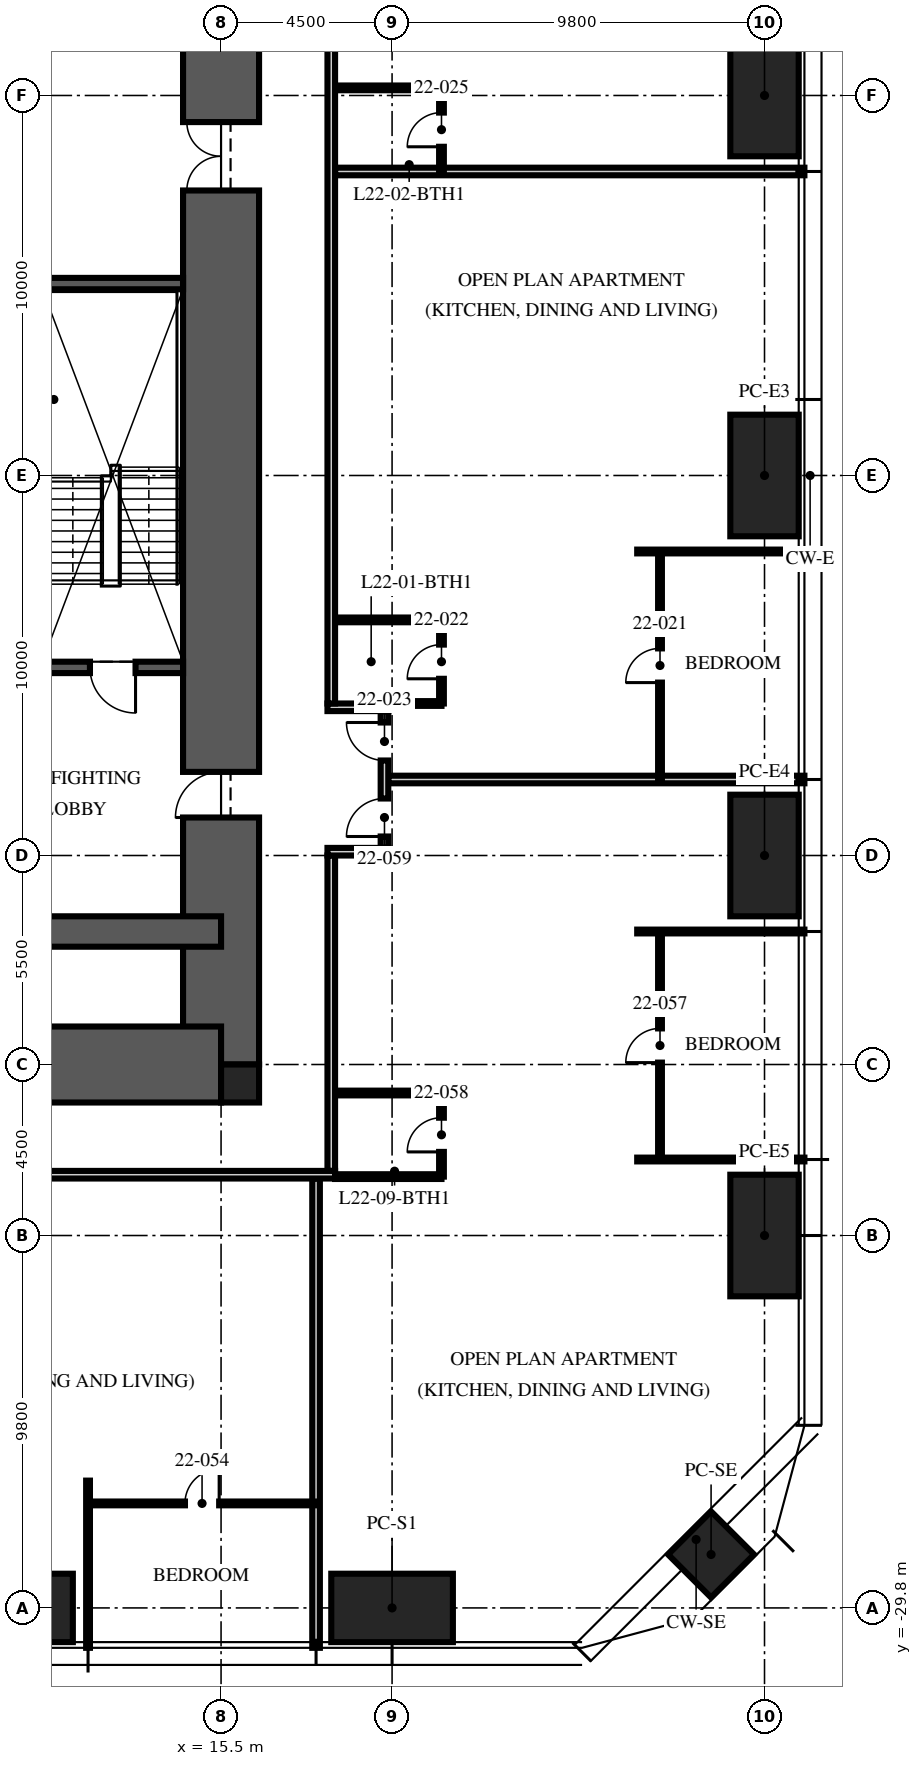
"""IFC4 building model, lengths in metres.
Left out: names, types, materials, properties, quantities, classifications, styles, units other than length and angle.
Written with IfcOpenShell. Run it as: python <this file> out.ifc"""

import sys

from ifc_helpers import new_model, si_unit, direction, frame, frame_2d, origin, origin_2d, place, context, subcontext, project, spatial, rectangle, hollow_rectangle, extrude, element, fill, save


model = new_model("IFC4")
c1 = context("Model", 3, precision=1e-05, world=origin(), true_north=direction((0.0, 1.0)))
c2 = subcontext(c1, "Body", "Model", "MODEL_VIEW")
j1 = project(units=[si_unit("LENGTHUNIT", "METRE"), si_unit("PLANEANGLEUNIT", "RADIAN")], contexts=[c1])
p1 = place(None, origin())
s1 = spatial("IfcSite", under=j1, at=p1, CompositionType="ELEMENT")
p2 = place(p1, origin())
s2 = spatial("IfcBuilding", under=s1, at=p2, CompositionType="ELEMENT")
p3 = place(p2, frame((0.0, 0.0, 88.5)))
s3 = spatial("IfcBuildingStorey", under=s2, at=p3, CompositionType="ELEMENT", Elevation=88.5)
p4 = place(p3, frame((15.5, -15.5, -0.25), z_axis=(0.0, 0.0, 1.0), x_axis=(0.0, 1.0, 0.0)))
e1 = element("IfcWall", 1, at=p4, inside=s3, PredefinedType="SHEAR", context=c2, shape_type="SweptSolid", body=[
    extrude(rectangle(XDim=31.0, YDim=2.0, at=frame_2d((15.5, 0.0))), origin(), (0.0, 0.0, 1.0), 3.75),
])
p5 = place(p4, frame((6.5, 0.0, 0.25)))
e2 = element("IfcOpeningElement", 2, at=p5, cuts=e1, PredefinedType="OPENING", context=c2, shape_type="SweptSolid", body=[
    extrude(rectangle(XDim=1.2, YDim=2.1, at=frame_2d((0.6, 1.05))), frame((0.0, 1.01, 0.0), z_axis=(0.0, -1.0, 0.0), x_axis=(1.0, 0.0, 0.0)), (0.0, 0.0, 1.0), 2.02),
])
p6 = place(p4, frame((23.0, 0.0, 0.25)))
e3 = element("IfcOpeningElement", 3, at=p6, cuts=e1, PredefinedType="OPENING", context=c2, shape_type="SweptSolid", body=[
    extrude(rectangle(XDim=1.8, YDim=2.1, at=frame_2d((0.9, 1.05))), frame((0.0, 1.01, 0.0), z_axis=(0.0, -1.0, 0.0), x_axis=(1.0, 0.0, 0.0)), (0.0, 0.0, 1.0), 2.02),
])
p7 = place(p3, frame((-15.5, -15.5, -0.25), z_axis=(0.0, 0.0, 1.0), x_axis=(1.0, 0.0, 0.0)))
e4 = element("IfcWall", 4, at=p7, inside=s3, PredefinedType="SHEAR", context=c2, shape_type="SweptSolid", body=[
    extrude(rectangle(XDim=31.0, YDim=2.0, at=frame_2d((15.5, 0.0))), origin(), (0.0, 0.0, 1.0), 3.75),
])
p8 = place(p3, frame((-15.5, -12.0, -0.25), z_axis=(0.0, 0.0, 1.0), x_axis=(1.0, 0.0, 0.0)))
e5 = element("IfcWall", 5, at=p8, inside=s3, PredefinedType="SHEAR", context=c2, shape_type="SweptSolid", body=[
    extrude(rectangle(XDim=31.0, YDim=0.8, at=frame_2d((15.5, 0.0))), origin(), (0.0, 0.0, 1.0), 3.75),
])
p9 = place(p3, frame((16.0, -16.0, -0.25), z_axis=(0.0, 0.0, 1.0), x_axis=(1.0, 0.0, 0.0)))
e6 = element("IfcColumn", 6, at=p9, inside=s3, PredefinedType="COLUMN", context=c2, shape_type="SweptSolid", body=[
    extrude(rectangle(XDim=1.0, YDim=1.0, at=origin_2d()), origin(), (0.0, 0.0, 1.0), 3.75),
])
for number, where, z_axis, x_axis in (
    (7, (29.8, 10.0, 0.0), (0.0, 0.0, 1.0), (0.0, 1.0, 0.0)),
    (8, (29.8, 0.0, 0.0), (0.0, 0.0, 1.0), (0.0, 1.0, 0.0)),
    (9, (29.8, -10.0, 0.0), (0.0, 0.0, 1.0), (0.0, 1.0, 0.0)),
    (10, (29.8, -20.0, 0.0), (0.0, 0.0, 1.0), (0.0, 1.0, 0.0)),
    (11, (20.0, -29.8, 0.0), (0.0, 0.0, 1.0), (1.0, 0.0, 0.0)),
    (12, (10.0, -29.8, 0.0), (0.0, 0.0, 1.0), (1.0, 0.0, 0.0)),
):
    element("IfcColumn", number, at=place(p3, frame(where, z_axis=z_axis, x_axis=x_axis)), inside=s3, PredefinedType="COLUMN", context=c2, shape_type="SweptSolid", body=[
        extrude(hollow_rectangle(XDim=3.2, YDim=1.8, WallThickness=0.2, at=origin_2d()), origin(), (0.0, 0.0, 1.0), 3.75),
    ])
p10 = place(p3, frame((28.394, -28.394, 0.0), z_axis=(0.0, 0.0, 1.0), x_axis=(0.707106781187, 0.707106781187, 0.0)))
e13 = element("IfcColumn", 13, at=p10, inside=s3, PredefinedType="COLUMN", context=c2, shape_type="SweptSolid", body=[
    extrude(hollow_rectangle(XDim=1.6, YDim=1.6, WallThickness=0.1, at=origin_2d()), origin(), (0.0, 0.0, 1.0), 3.75),
])
p11 = place(p3, frame((14.5, -5.05, 0.0), z_axis=(0.0, 0.0, 1.0), x_axis=(-1.0, 0.0, 0.0)))
e14 = element("IfcWall", 14, at=p11, inside=s3, PredefinedType="SOLIDWALL", context=c2, shape_type="SweptSolid", body=[
    extrude(rectangle(XDim=5.7, YDim=0.3, at=frame_2d((2.85, 0.0))), origin(), (0.0, 0.0, 1.0), 3.5),
])
p12 = place(p11, frame((1.25, 0.0, 0.0)))
e15 = element("IfcOpeningElement", 15, at=p12, cuts=e14, PredefinedType="OPENING", context=c2, shape_type="SweptSolid", body=[
    extrude(rectangle(XDim=1.2, YDim=2.1, at=frame_2d((0.6, 1.05))), frame((0.0, 0.16, 0.0), z_axis=(0.0, -1.0, 0.0), x_axis=(1.0, 0.0, 0.0)), (0.0, 0.0, 1.0), 0.32),
])
p13 = place(p3, frame((14.5, 5.05, 0.0), z_axis=(0.0, 0.0, 1.0), x_axis=(-1.0, 0.0, 0.0)))
e16 = element("IfcWall", 16, at=p13, inside=s3, PredefinedType="SOLIDWALL", context=c2, shape_type="SweptSolid", body=[
    extrude(rectangle(XDim=3.7, YDim=0.3, at=frame_2d((1.85, 0.0))), origin(), (0.0, 0.0, 1.0), 3.5),
])
p14 = place(p3, frame((19.9, -8.0, 0.0), z_axis=(0.0, 0.0, 1.0), x_axis=(1.0, 0.0, 0.0)))
e17 = element("IfcWall", 17, at=p14, inside=s3, PredefinedType="PARTITIONING", context=c2, shape_type="SweptSolid", body=[
    extrude(rectangle(XDim=10.95, YDim=0.2, at=frame_2d((5.475, 0.0))), origin(), (0.0, 0.0, 1.0), 2.71),
])
p15 = place(p3, frame((26.45, -2.0, 0.0), z_axis=(0.0, 0.0, 1.0), x_axis=(1.0, 0.0, 0.0)))
e18 = element("IfcWall", 18, at=p15, inside=s3, PredefinedType="PARTITIONING", context=c2, shape_type="SweptSolid", body=[
    extrude(rectangle(XDim=4.4, YDim=0.1, at=frame_2d((2.2, 0.0))), origin(), (0.0, 0.0, 1.0), 2.71),
])
p16 = place(p3, frame((18.5, 8.0, 0.0), z_axis=(0.0, 0.0, 1.0), x_axis=(1.0, 0.0, 0.0)))
e19 = element("IfcWall", 19, at=p16, inside=s3, PredefinedType="PARTITIONING", context=c2, shape_type="SweptSolid", body=[
    extrude(rectangle(XDim=12.35, YDim=0.2, at=frame_2d((6.175, 0.0))), origin(), (0.0, 0.0, 1.0), 2.71),
])
p17 = place(p3, frame((12.0, -26.45, 0.0), z_axis=(0.0, 0.0, 1.0), x_axis=(0.0, -1.0, 0.0)))
e20 = element("IfcWall", 20, at=p17, inside=s3, PredefinedType="PARTITIONING", context=c2, shape_type="SweptSolid", body=[
    extrude(rectangle(XDim=4.4, YDim=0.1, at=frame_2d((2.2, 0.0))), origin(), (0.0, 0.0, 1.0), 2.71),
])
p18 = place(p3, frame((18.0, -18.5, 0.0), z_axis=(0.0, 0.0, 1.0), x_axis=(0.0, -1.0, 0.0)))
e21 = element("IfcWall", 21, at=p18, inside=s3, PredefinedType="PARTITIONING", context=c2, shape_type="SweptSolid", body=[
    extrude(rectangle(XDim=12.35, YDim=0.2, at=frame_2d((6.175, 0.0))), origin(), (0.0, 0.0, 1.0), 2.3),
])
for number, where, z_axis, x_axis in (
    (22, (26.45, -18.0, 0.0), (0.0, 0.0, 1.0), (1.0, 0.0, 0.0)),
    (23, (26.45, -12.0, 0.0), (0.0, 0.0, 1.0), (1.0, 0.0, 0.0)),
):
    element("IfcWall", number, at=place(p3, frame(where, z_axis=z_axis, x_axis=x_axis)), inside=s3, PredefinedType="PARTITIONING", context=c2, shape_type="SweptSolid", body=[
        extrude(rectangle(XDim=4.4, YDim=0.1, at=frame_2d((2.2, 0.0))), origin(), (0.0, 0.0, 1.0), 2.71),
    ])
p19 = place(p3, frame((27.05, -8.0, 0.0), z_axis=(0.0, 0.0, 1.0), x_axis=(0.0, 1.0, 0.0)))
e24 = element("IfcWall", 24, at=p19, inside=s3, PredefinedType="PARTITIONING", context=c2, shape_type="SweptSolid", body=[
    extrude(rectangle(XDim=6.0, YDim=0.1, at=frame_2d((3.0, 0.0))), origin(), (0.0, 0.0, 1.0), 2.61),
])
p20 = place(p19, frame((2.55, 0.0, 0.0)))
e25 = element("IfcOpeningElement", 25, at=p20, cuts=e24, PredefinedType="OPENING", context=c2, shape_type="SweptSolid", body=[
    extrude(rectangle(XDim=0.9, YDim=2.1, at=frame_2d((0.45, 1.05))), frame((0.0, 0.06, 0.0), z_axis=(0.0, -1.0, 0.0), x_axis=(1.0, 0.0, 0.0)), (0.0, 0.0, 1.0), 0.12),
])
p21 = place(p3, frame((21.3, -6.0, 0.0), z_axis=(0.0, 0.0, 1.0), x_axis=(0.0, 1.0, 0.0)))
e26 = element("IfcWall", 26, at=p21, inside=s3, PredefinedType="PARTITIONING", context=c2, shape_type="SweptSolid", body=[
    extrude(rectangle(XDim=2.2, YDim=0.125, at=frame_2d((1.1, 0.0))), origin(), (0.0, 0.0, 1.0), 2.61),
])
p22 = place(p21, frame((0.65, 0.0, 0.0)))
e27 = element("IfcOpeningElement", 27, at=p22, cuts=e26, PredefinedType="OPENING", context=c2, shape_type="SweptSolid", body=[
    extrude(rectangle(XDim=0.9, YDim=2.1, at=frame_2d((0.45, 1.05))), frame((0.0, 0.073, 0.0), z_axis=(0.0, -1.0, 0.0), x_axis=(1.0, 0.0, 0.0)), (0.0, 0.0, 1.0), 0.145),
])
p23 = place(p3, frame((19.97, -6.0, 0.0), z_axis=(0.0, 0.0, 1.0), x_axis=(1.0, 0.0, 0.0)))
e28 = element("IfcWall", 28, at=p23, inside=s3, PredefinedType="PARTITIONING", context=c2, shape_type="SweptSolid", body=[
    extrude(rectangle(XDim=1.33, YDim=0.125, at=frame_2d((0.665, 0.0))), origin(), (0.0, 0.0, 1.0), 3.5),
])
p24 = place(p3, frame((18.5, -3.8, 0.0), z_axis=(0.0, 0.0, 1.0), x_axis=(1.0, 0.0, 0.0)))
e29 = element("IfcWall", 29, at=p24, inside=s3, PredefinedType="PARTITIONING", context=c2, shape_type="SweptSolid", body=[
    extrude(rectangle(XDim=2.8, YDim=0.125, at=frame_2d((1.4, 0.0))), origin(), (0.0, 0.0, 1.0), 3.5),
])
p25 = place(p3, frame((21.3, 8.0, 0.0), z_axis=(0.0, 0.0, 1.0), x_axis=(0.0, 1.0, 0.0)))
e30 = element("IfcWall", 30, at=p25, inside=s3, PredefinedType="PARTITIONING", context=c2, shape_type="SweptSolid", body=[
    extrude(rectangle(XDim=2.2, YDim=0.125, at=frame_2d((1.1, 0.0))), origin(), (0.0, 0.0, 1.0), 2.492),
])
p26 = place(p25, frame((0.65, 0.0, 0.0)))
e31 = element("IfcOpeningElement", 31, at=p26, cuts=e30, PredefinedType="OPENING", context=c2, shape_type="SweptSolid", body=[
    extrude(rectangle(XDim=0.9, YDim=2.1, at=frame_2d((0.45, 1.05))), frame((0.0, 0.073, 0.0), z_axis=(0.0, -1.0, 0.0), x_axis=(1.0, 0.0, 0.0)), (0.0, 0.0, 1.0), 0.145),
])
p27 = place(p3, frame((18.5, 10.2, 0.0), z_axis=(0.0, 0.0, 1.0), x_axis=(1.0, 0.0, 0.0)))
e32 = element("IfcWall", 32, at=p27, inside=s3, PredefinedType="PARTITIONING", context=c2, shape_type="SweptSolid", body=[
    extrude(rectangle(XDim=2.8, YDim=0.125, at=frame_2d((1.4, 0.0))), origin(), (0.0, 0.0, 1.0), 2.492),
])
p28 = place(p3, frame((12.0, -27.05, 0.0), z_axis=(0.0, 0.0, 1.0), x_axis=(1.0, 0.0, 0.0)))
e33 = element("IfcWall", 33, at=p28, inside=s3, PredefinedType="PARTITIONING", context=c2, shape_type="SweptSolid", body=[
    extrude(rectangle(XDim=6.0, YDim=0.1, at=frame_2d((3.0, 0.0))), origin(), (0.0, 0.0, 1.0), 2.61),
])
p29 = place(p28, frame((2.55, 0.0, 0.0)))
e34 = element("IfcOpeningElement", 34, at=p29, cuts=e33, PredefinedType="OPENING", context=c2, shape_type="SweptSolid", body=[
    extrude(rectangle(XDim=0.9, YDim=2.1, at=frame_2d((0.45, 1.05))), frame((0.0, 0.06, 0.0), z_axis=(0.0, -1.0, 0.0), x_axis=(1.0, 0.0, 0.0)), (0.0, 0.0, 1.0), 0.12),
])
p30 = place(p3, frame((27.05, -18.0, 0.0), z_axis=(0.0, 0.0, 1.0), x_axis=(0.0, 1.0, 0.0)))
e35 = element("IfcWall", 35, at=p30, inside=s3, PredefinedType="PARTITIONING", context=c2, shape_type="SweptSolid", body=[
    extrude(rectangle(XDim=6.0, YDim=0.1, at=frame_2d((3.0, 0.0))), origin(), (0.0, 0.0, 1.0), 2.61),
])
p31 = place(p30, frame((2.55, 0.0, 0.0)))
e36 = element("IfcOpeningElement", 36, at=p31, cuts=e35, PredefinedType="OPENING", context=c2, shape_type="SweptSolid", body=[
    extrude(rectangle(XDim=0.9, YDim=2.1, at=frame_2d((0.45, 1.05))), frame((0.0, 0.06, 0.0), z_axis=(0.0, -1.0, 0.0), x_axis=(1.0, 0.0, 0.0)), (0.0, 0.0, 1.0), 0.12),
])
p32 = place(p3, frame((21.3, -18.45, 0.0), z_axis=(0.0, 0.0, 1.0), x_axis=(0.0, 1.0, 0.0)))
e37 = element("IfcWall", 37, at=p32, inside=s3, PredefinedType="PARTITIONING", context=c2, shape_type="SweptSolid", body=[
    extrude(rectangle(XDim=2.2, YDim=0.125, at=frame_2d((1.1, 0.0))), origin(), (0.0, 0.0, 1.0), 3.5),
])
p33 = place(p32, frame((0.65, 0.0, 0.0)))
e38 = element("IfcOpeningElement", 38, at=p33, cuts=e37, PredefinedType="OPENING", context=c2, shape_type="SweptSolid", body=[
    extrude(rectangle(XDim=0.9, YDim=2.1, at=frame_2d((0.45, 1.05))), frame((0.0, 0.073, 0.0), z_axis=(0.0, -1.0, 0.0), x_axis=(1.0, 0.0, 0.0)), (0.0, 0.0, 1.0), 0.145),
])
p34 = place(p3, frame((18.5, -18.45, 0.0), z_axis=(0.0, 0.0, 1.0), x_axis=(1.0, 0.0, 0.0)))
e39 = element("IfcWall", 39, at=p34, inside=s3, PredefinedType="PARTITIONING", context=c2, shape_type="SweptSolid", body=[
    extrude(rectangle(XDim=2.8, YDim=0.125, at=frame_2d((1.4, 0.0))), origin(), (0.0, 0.0, 1.0), 2.3),
])
p35 = place(p3, frame((18.5, -16.25, 0.0), z_axis=(0.0, 0.0, 1.0), x_axis=(1.0, 0.0, 0.0)))
e40 = element("IfcWall", 40, at=p35, inside=s3, PredefinedType="PARTITIONING", context=c2, shape_type="SweptSolid", body=[
    extrude(rectangle(XDim=2.8, YDim=0.125, at=frame_2d((1.4, 0.0))), origin(), (0.0, 0.0, 1.0), 3.5),
])
p36 = place(p3, frame((18.4, -18.3, 0.0), z_axis=(0.0, 0.0, 1.0), x_axis=(0.0, 1.0, 0.0)))
e41 = element("IfcWall", 41, at=p36, inside=s3, PredefinedType="PARTITIONING", context=c2, shape_type="SweptSolid", body=[
    extrude(rectangle(XDim=8.3, YDim=0.2, at=frame_2d((4.15, 0.0))), origin(), (0.0, 0.0, 1.0), 2.3),
])
p37 = place(p3, frame((18.3, -9.9, 0.0), z_axis=(0.0, 0.0, 1.0), x_axis=(1.0, 0.0, 0.0)))
e42 = element("IfcWall", 42, at=p37, inside=s3, PredefinedType="PARTITIONING", context=c2, shape_type="SweptSolid", body=[
    extrude(rectangle(XDim=1.6, YDim=0.2, at=frame_2d((0.8, 0.0))), origin(), (0.0, 0.0, 1.0), 2.492),
])
p38 = place(p3, frame((18.3, -6.1, 0.0), z_axis=(0.0, 0.0, 1.0), x_axis=(1.0, 0.0, 0.0)))
e43 = element("IfcWall", 43, at=p38, inside=s3, PredefinedType="PARTITIONING", context=c2, shape_type="SweptSolid", body=[
    extrude(rectangle(XDim=1.6, YDim=0.2, at=frame_2d((0.8, 0.0))), origin(), (0.0, 0.0, 1.0), 3.5),
])
p39 = place(p3, frame((19.8, -9.8, 0.0), z_axis=(0.0, 0.0, 1.0), x_axis=(0.0, 1.0, 0.0)))
e44 = element("IfcWall", 44, at=p39, inside=s3, PredefinedType="PARTITIONING", context=c2, shape_type="SweptSolid", body=[
    extrude(rectangle(XDim=3.6, YDim=0.2, at=frame_2d((1.8, 0.0))), origin(), (0.0, 0.0, 1.0), 3.5),
])
p40 = place(p39, frame((2.3, 0.0, 0.0)))
e45 = element("IfcOpeningElement", 45, at=p40, cuts=e44, PredefinedType="OPENING", context=c2, shape_type="SweptSolid", body=[
    extrude(rectangle(XDim=1.0, YDim=2.2, at=frame_2d((0.5, 1.1))), frame((0.0, 0.11, 0.0), z_axis=(0.0, -1.0, 0.0), x_axis=(1.0, 0.0, 0.0)), (0.0, 0.0, 1.0), 0.22),
])
p41 = place(p39, frame((0.3, 0.0, 0.0)))
e46 = element("IfcOpeningElement", 46, at=p41, cuts=e44, PredefinedType="OPENING", context=c2, shape_type="SweptSolid", body=[
    extrude(rectangle(XDim=1.0, YDim=2.2, at=frame_2d((0.5, 1.1))), frame((0.0, 0.11, 0.0), z_axis=(0.0, -1.0, 0.0), x_axis=(1.0, 0.0, 0.0)), (0.0, 0.0, 1.0), 0.22),
])
p42 = place(p3, frame((18.4, -6.0, 0.0), z_axis=(0.0, 0.0, 1.0), x_axis=(0.0, 1.0, 0.0)))
e47 = element("IfcWall", 47, at=p42, inside=s3, PredefinedType="PARTITIONING", context=c2, shape_type="SweptSolid", body=[
    extrude(rectangle(XDim=24.3, YDim=0.2, at=frame_2d((12.15, 0.0))), origin(), (0.0, 0.0, 1.0), 2.3),
])
p43 = place(p42, frame((22.27, 0.0, 0.0)))
e48 = element("IfcOpeningElement", 48, at=p43, cuts=e47, PredefinedType="OPENING", context=c2, shape_type="SweptSolid", body=[
    extrude(rectangle(XDim=1.0, YDim=2.2, at=frame_2d((0.5, 1.1))), frame((0.0, 0.11, 0.0), z_axis=(0.0, -1.0, 0.0), x_axis=(1.0, 0.0, 0.0)), (0.0, 0.0, 1.0), 0.22),
])
p44 = place(p3, frame((18.5, -18.4, 0.0), z_axis=(0.0, 0.0, 1.0), x_axis=(-1.0, 0.0, 0.0)))
e49 = element("IfcWall", 49, at=p44, inside=s3, PredefinedType="PARTITIONING", context=c2, shape_type="SweptSolid", body=[
    extrude(rectangle(XDim=18.5, YDim=0.2, at=frame_2d((9.25, 0.0))), origin(), (0.0, 0.0, 1.0), 2.3),
])
p45 = place(p12, origin())
e50 = element("IfcDoor", 50, at=p45, inside=s3, OperationType="SINGLE_SWING_LEFT", PredefinedType="DOOR", context=c2, shape_type="SweptSolid", body=[
    extrude(rectangle(XDim=1.2, YDim=2.1, at=frame_2d((0.6, 1.05))), frame((0.0, 0.025, 0.0), z_axis=(0.0, -1.0, 0.0), x_axis=(1.0, 0.0, 0.0)), (0.0, 0.0, 1.0), 0.05),
])
fill(e15, e50)
p46 = place(p5, origin())
e51 = element("IfcDoor", 51, at=p46, inside=s3, OperationType="SINGLE_SWING_LEFT", PredefinedType="DOOR", context=c2, shape_type="SweptSolid", body=[
    extrude(rectangle(XDim=1.2, YDim=2.1, at=frame_2d((0.6, 1.05))), frame((0.0, 0.025, 0.0), z_axis=(0.0, -1.0, 0.0), x_axis=(1.0, 0.0, 0.0)), (0.0, 0.0, 1.0), 0.05),
])
fill(e2, e51)
p47 = place(p6, origin())
e52 = element("IfcDoor", 52, at=p47, inside=s3, OperationType="DOUBLE_DOOR_SINGLE_SWING", PredefinedType="DOOR", context=c2, shape_type="SweptSolid", body=[
    extrude(rectangle(XDim=1.8, YDim=2.1, at=frame_2d((0.9, 1.05))), frame((0.0, 0.025, 0.0), z_axis=(0.0, -1.0, 0.0), x_axis=(1.0, 0.0, 0.0)), (0.0, 0.0, 1.0), 0.05),
])
fill(e3, e52)
p48 = place(p20, origin())
e53 = element("IfcDoor", 53, at=p48, inside=s3, OperationType="SINGLE_SWING_LEFT", PredefinedType="DOOR", context=c2, shape_type="SweptSolid", body=[
    extrude(rectangle(XDim=0.9, YDim=2.1, at=frame_2d((0.45, 1.05))), frame((0.0, 0.025, 0.0), z_axis=(0.0, -1.0, 0.0), x_axis=(1.0, 0.0, 0.0)), (0.0, 0.0, 1.0), 0.05),
])
fill(e25, e53)
p49 = place(p22, origin())
e54 = element("IfcDoor", 54, at=p49, inside=s3, OperationType="SINGLE_SWING_LEFT", PredefinedType="DOOR", context=c2, shape_type="SweptSolid", body=[
    extrude(rectangle(XDim=0.9, YDim=2.1, at=frame_2d((0.45, 1.05))), frame((0.0, 0.025, 0.0), z_axis=(0.0, -1.0, 0.0), x_axis=(1.0, 0.0, 0.0)), (0.0, 0.0, 1.0), 0.05),
])
fill(e27, e54)
p50 = place(p40, origin())
e55 = element("IfcDoor", 55, at=p50, inside=s3, OperationType="SINGLE_SWING_RIGHT", PredefinedType="DOOR", context=c2, shape_type="SweptSolid", body=[
    extrude(rectangle(XDim=1.0, YDim=2.2, at=frame_2d((0.5, 1.1))), frame((0.0, 0.025, 0.0), z_axis=(0.0, -1.0, 0.0), x_axis=(1.0, 0.0, 0.0)), (0.0, 0.0, 1.0), 0.05),
])
fill(e45, e55)
p51 = place(p26, origin())
e56 = element("IfcDoor", 56, at=p51, inside=s3, OperationType="SINGLE_SWING_LEFT", PredefinedType="DOOR", context=c2, shape_type="SweptSolid", body=[
    extrude(rectangle(XDim=0.9, YDim=2.1, at=frame_2d((0.45, 1.05))), frame((0.0, 0.025, 0.0), z_axis=(0.0, -1.0, 0.0), x_axis=(1.0, 0.0, 0.0)), (0.0, 0.0, 1.0), 0.05),
])
fill(e31, e56)
p52 = place(p29, origin())
e57 = element("IfcDoor", 57, at=p52, inside=s3, OperationType="SINGLE_SWING_RIGHT", PredefinedType="DOOR", context=c2, shape_type="SweptSolid", body=[
    extrude(rectangle(XDim=0.9, YDim=2.1, at=frame_2d((0.45, 1.05))), frame((0.0, 0.025, 0.0), z_axis=(0.0, -1.0, 0.0), x_axis=(1.0, 0.0, 0.0)), (0.0, 0.0, 1.0), 0.05),
])
fill(e34, e57)
p53 = place(p31, origin())
e58 = element("IfcDoor", 58, at=p53, inside=s3, OperationType="SINGLE_SWING_LEFT", PredefinedType="DOOR", context=c2, shape_type="SweptSolid", body=[
    extrude(rectangle(XDim=0.9, YDim=2.1, at=frame_2d((0.45, 1.05))), frame((0.0, 0.025, 0.0), z_axis=(0.0, -1.0, 0.0), x_axis=(1.0, 0.0, 0.0)), (0.0, 0.0, 1.0), 0.05),
])
fill(e36, e58)
p54 = place(p33, origin())
e59 = element("IfcDoor", 59, at=p54, inside=s3, OperationType="SINGLE_SWING_LEFT", PredefinedType="DOOR", context=c2, shape_type="SweptSolid", body=[
    extrude(rectangle(XDim=0.9, YDim=2.1, at=frame_2d((0.45, 1.05))), frame((0.0, 0.025, 0.0), z_axis=(0.0, -1.0, 0.0), x_axis=(1.0, 0.0, 0.0)), (0.0, 0.0, 1.0), 0.05),
])
fill(e38, e59)
p55 = place(p41, origin())
e60 = element("IfcDoor", 60, at=p55, inside=s3, OperationType="SINGLE_SWING_LEFT", PredefinedType="DOOR", context=c2, shape_type="SweptSolid", body=[
    extrude(rectangle(XDim=1.0, YDim=2.2, at=frame_2d((0.5, 1.1))), frame((0.0, 0.025, 0.0), z_axis=(0.0, -1.0, 0.0), x_axis=(1.0, 0.0, 0.0)), (0.0, 0.0, 1.0), 0.05),
])
fill(e46, e60)
save(model, sys.argv[1])
